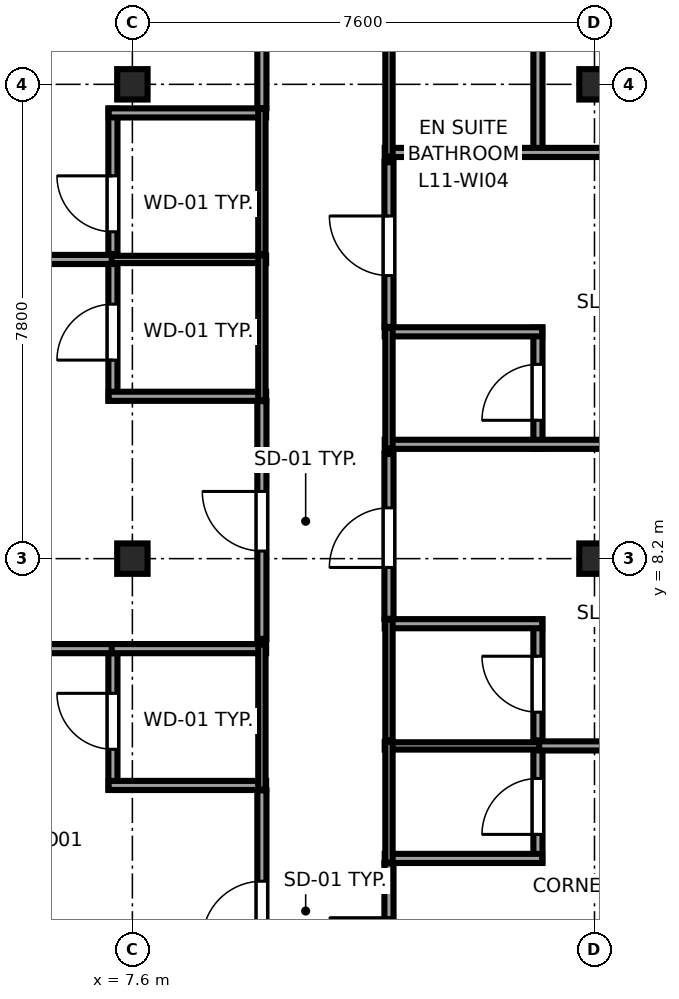
"""IFC4 building model, lengths in metres.
Left out: names, types, materials, properties, quantities, classifications, styles, units other than length and angle.
Written with IfcOpenShell. Run it as: python <this file> out.ifc"""

import sys

from ifc_helpers import new_model, si_unit, direction, frame, frame_2d, origin, origin_2d, place, context, subcontext, project, spatial, rectangle, i_section, extrude, source, transform, mapped, element, fill, save


model = new_model("IFC4")
c1 = context("Model", 3, precision=1e-05, world=origin(), true_north=direction((0.0, 1.0)))
c2 = subcontext(c1, "Body", "Model", "MODEL_VIEW")
j1 = project(units=[si_unit("LENGTHUNIT", "METRE"), si_unit("PLANEANGLEUNIT", "RADIAN")], contexts=[c1])
p1 = place(None, origin())
s1 = spatial("IfcSite", under=j1, at=p1, CompositionType="ELEMENT")
p2 = place(p1, origin())
s2 = spatial("IfcBuilding", under=s1, at=p2, CompositionType="ELEMENT")
p3 = place(p2, frame((0.0, 0.0, 49.75)))
s3 = spatial("IfcBuildingStorey", under=s2, at=p3, CompositionType="ELEMENT", Elevation=49.75)
m1 = source(origin(), c2, "Body", "SweptSolid", [
    extrude(i_section(OverallWidth=0.5, OverallDepth=0.5, WebThickness=0.028, FlangeThickness=0.045, at=origin_2d()), origin(), (0.0, 0.0, 1.0), 3.55),
])
for number, where, z_axis, x_axis in (
    (1, (7.6, 8.2, 0.0), (0.0, 0.0, 1.0), (1.0, 0.0, 0.0)),
    (2, (7.6, 16.0, 0.0), (0.0, 0.0, 1.0), (1.0, 0.0, 0.0)),
    (3, (15.2, 8.2, 0.0), (0.0, 0.0, 1.0), (1.0, 0.0, 0.0)),
    (4, (15.2, 16.0, 0.0), (0.0, 0.0, 1.0), (1.0, 0.0, 0.0)),
):
    element("IfcColumn", number, at=place(p3, frame(where, z_axis=z_axis, x_axis=x_axis)), inside=s3, PredefinedType="COLUMN", context=c2, shape_type="MappedRepresentation", body=[
        mapped(m1, transform((0.0, 0.0, 0.0), x_axis=(1.0, 0.0, 0.0), y_axis=(0.0, 1.0, 0.0), z_axis=(0.0, 0.0, 1.0), scale=1.0)),
    ])
p4 = place(p3, frame((7.28, 4.4, 0.0), z_axis=(0.0, 0.0, 1.0), x_axis=(0.0, 1.0, 0.0)))
e5 = element("IfcWall", 5, at=p4, inside=s3, PredefinedType="PARTITIONING", context=c2, shape_type="SweptSolid", body=[
    extrude(rectangle(XDim=2.39, YDim=0.15, at=frame_2d((1.195, 0.0))), origin(), (0.0, 0.0, 1.0), 3.37),
])
p5 = place(p4, frame((0.665, 0.0, 0.0)))
e6 = element("IfcOpeningElement", 6, at=p5, cuts=e5, PredefinedType="OPENING", context=c2, shape_type="SweptSolid", body=[
    extrude(rectangle(XDim=0.92, YDim=2.01, at=frame_2d((0.46, 1.005))), frame((0.0, 0.085, 0.0), z_axis=(0.0, -1.0, 0.0), x_axis=(1.0, 0.0, 0.0)), (0.0, 0.0, 1.0), 0.17),
])
for number, where, z_axis, x_axis in (
    (7, (7.21, 4.47, 0.0), (0.0, 0.0, 1.0), (1.0, 0.0, 0.0)),
    (8, (7.21, 6.72, 0.0), (0.0, 0.0, 1.0), (1.0, 0.0, 0.0)),
):
    element("IfcWall", number, at=place(p3, frame(where, z_axis=z_axis, x_axis=x_axis)), inside=s3, PredefinedType="PARTITIONING", context=c2, shape_type="SweptSolid", body=[
        extrude(rectangle(XDim=2.59, YDim=0.15, at=frame_2d((1.295, 0.0))), origin(), (0.0, 0.0, 1.0), 3.37),
    ])
p6 = place(p3, frame((9.73, 4.4, 0.0), z_axis=(0.0, 0.0, 1.0), x_axis=(0.0, 1.0, 0.0)))
e9 = element("IfcWall", 9, at=p6, inside=s3, PredefinedType="PLUMBINGWALL", context=c2, shape_type="SweptSolid", body=[
    extrude(rectangle(XDim=2.39, YDim=0.12, at=frame_2d((1.195, 0.0))), origin(), (0.0, 0.0, 1.0), 3.37),
])
p7 = place(p3, frame((7.28, 10.8, 0.0), z_axis=(0.0, 0.0, 1.0), x_axis=(0.0, 1.0, 0.0)))
e10 = element("IfcWall", 10, at=p7, inside=s3, PredefinedType="PARTITIONING", context=c2, shape_type="SweptSolid", body=[
    extrude(rectangle(XDim=2.39, YDim=0.15, at=frame_2d((1.195, 0.0))), origin(), (0.0, 0.0, 1.0), 3.37),
])
p8 = place(p7, frame((0.665, 0.0, 0.0)))
e11 = element("IfcOpeningElement", 11, at=p8, cuts=e10, PredefinedType="OPENING", context=c2, shape_type="SweptSolid", body=[
    extrude(rectangle(XDim=0.92, YDim=2.01, at=frame_2d((0.46, 1.005))), frame((0.0, 0.085, 0.0), z_axis=(0.0, -1.0, 0.0), x_axis=(1.0, 0.0, 0.0)), (0.0, 0.0, 1.0), 0.17),
])
p9 = place(p3, frame((7.21, 10.87, 0.0), z_axis=(0.0, 0.0, 1.0), x_axis=(1.0, 0.0, 0.0)))
e12 = element("IfcWall", 12, at=p9, inside=s3, PredefinedType="PARTITIONING", context=c2, shape_type="SweptSolid", body=[
    extrude(rectangle(XDim=2.59, YDim=0.15, at=frame_2d((1.295, 0.0))), origin(), (0.0, 0.0, 1.0), 3.37),
])
p10 = place(p3, frame((7.21, 13.12, 0.0), z_axis=(0.0, 0.0, 1.0), x_axis=(1.0, 0.0, 0.0)))
e13 = element("IfcWall", 13, at=p10, inside=s3, PredefinedType="PLUMBINGWALL", context=c2, shape_type="SweptSolid", body=[
    extrude(rectangle(XDim=2.59, YDim=0.12, at=frame_2d((1.295, 0.0))), origin(), (0.0, 0.0, 1.0), 3.37),
])
p11 = place(p3, frame((9.73, 10.8, 0.0), z_axis=(0.0, 0.0, 1.0), x_axis=(0.0, 1.0, 0.0)))
e14 = element("IfcWall", 14, at=p11, inside=s3, PredefinedType="PLUMBINGWALL", context=c2, shape_type="SweptSolid", body=[
    extrude(rectangle(XDim=2.39, YDim=0.12, at=frame_2d((1.195, 0.0))), origin(), (0.0, 0.0, 1.0), 3.37),
])
p12 = place(p3, frame((7.28, 13.21, 0.0), z_axis=(0.0, 0.0, 1.0), x_axis=(0.0, 1.0, 0.0)))
e15 = element("IfcWall", 15, at=p12, inside=s3, PredefinedType="PARTITIONING", context=c2, shape_type="SweptSolid", body=[
    extrude(rectangle(XDim=2.39, YDim=0.15, at=frame_2d((1.195, 0.0))), origin(), (0.0, 0.0, 1.0), 3.37),
])
p13 = place(p12, frame((0.365, 0.0, 0.0)))
e16 = element("IfcOpeningElement", 16, at=p13, cuts=e15, PredefinedType="OPENING", context=c2, shape_type="SweptSolid", body=[
    extrude(rectangle(XDim=0.92, YDim=2.01, at=frame_2d((0.46, 1.005))), frame((0.0, 0.085, 0.0), z_axis=(0.0, -1.0, 0.0), x_axis=(1.0, 0.0, 0.0)), (0.0, 0.0, 1.0), 0.17),
])
p14 = place(p3, frame((7.21, 15.53, 0.0), z_axis=(0.0, 0.0, 1.0), x_axis=(1.0, 0.0, 0.0)))
e17 = element("IfcWall", 17, at=p14, inside=s3, PredefinedType="PARTITIONING", context=c2, shape_type="SweptSolid", body=[
    extrude(rectangle(XDim=2.59, YDim=0.15, at=frame_2d((1.295, 0.0))), origin(), (0.0, 0.0, 1.0), 3.37),
])
p15 = place(p3, frame((9.73, 13.21, 0.0), z_axis=(0.0, 0.0, 1.0), x_axis=(0.0, 1.0, 0.0)))
e18 = element("IfcWall", 18, at=p15, inside=s3, PredefinedType="PLUMBINGWALL", context=c2, shape_type="SweptSolid", body=[
    extrude(rectangle(XDim=2.39, YDim=0.12, at=frame_2d((1.195, 0.0))), origin(), (0.0, 0.0, 1.0), 3.37),
])
p16 = place(p3, frame((14.27, 3.2, 0.0), z_axis=(0.0, 0.0, 1.0), x_axis=(0.0, 1.0, 0.0)))
e19 = element("IfcWall", 19, at=p16, inside=s3, PredefinedType="PARTITIONING", context=c2, shape_type="SweptSolid", body=[
    extrude(rectangle(XDim=1.99, YDim=0.15, at=frame_2d((0.995, 0.0))), origin(), (0.0, 0.0, 1.0), 3.37),
])
p17 = place(p16, frame((0.465, 0.0, 0.0)))
e20 = element("IfcOpeningElement", 20, at=p17, cuts=e19, PredefinedType="OPENING", context=c2, shape_type="SweptSolid", body=[
    extrude(rectangle(XDim=0.92, YDim=2.01, at=frame_2d((0.46, 1.005))), frame((0.0, 0.085, 0.0), z_axis=(0.0, -1.0, 0.0), x_axis=(1.0, 0.0, 0.0)), (0.0, 0.0, 1.0), 0.17),
])
p18 = place(p3, frame((11.75, 3.27, 0.0), z_axis=(0.0, 0.0, 1.0), x_axis=(1.0, 0.0, 0.0)))
e21 = element("IfcWall", 21, at=p18, inside=s3, PredefinedType="PARTITIONING", context=c2, shape_type="SweptSolid", body=[
    extrude(rectangle(XDim=2.59, YDim=0.15, at=frame_2d((1.295, 0.0))), origin(), (0.0, 0.0, 1.0), 3.37),
])
p19 = place(p3, frame((11.75, 5.12, 0.0), z_axis=(0.0, 0.0, 1.0), x_axis=(1.0, 0.0, 0.0)))
e22 = element("IfcWall", 22, at=p19, inside=s3, PredefinedType="PLUMBINGWALL", context=c2, shape_type="SweptSolid", body=[
    extrude(rectangle(XDim=2.59, YDim=0.12, at=frame_2d((1.295, 0.0))), origin(), (0.0, 0.0, 1.0), 3.37),
])
p20 = place(p3, frame((11.82, 3.2, 0.0), z_axis=(0.0, 0.0, 1.0), x_axis=(0.0, 1.0, 0.0)))
e23 = element("IfcWall", 23, at=p20, inside=s3, PredefinedType="PLUMBINGWALL", context=c2, shape_type="SweptSolid", body=[
    extrude(rectangle(XDim=1.99, YDim=0.12, at=frame_2d((0.995, 0.0))), origin(), (0.0, 0.0, 1.0), 3.37),
])
p21 = place(p3, frame((14.27, 5.21, 0.0), z_axis=(0.0, 0.0, 1.0), x_axis=(0.0, 1.0, 0.0)))
e24 = element("IfcWall", 24, at=p21, inside=s3, PredefinedType="PARTITIONING", context=c2, shape_type="SweptSolid", body=[
    extrude(rectangle(XDim=1.99, YDim=0.15, at=frame_2d((0.995, 0.0))), origin(), (0.0, 0.0, 1.0), 3.37),
])
p22 = place(p21, frame((0.465, 0.0, 0.0)))
e25 = element("IfcOpeningElement", 25, at=p22, cuts=e24, PredefinedType="OPENING", context=c2, shape_type="SweptSolid", body=[
    extrude(rectangle(XDim=0.92, YDim=2.01, at=frame_2d((0.46, 1.005))), frame((0.0, 0.085, 0.0), z_axis=(0.0, -1.0, 0.0), x_axis=(1.0, 0.0, 0.0)), (0.0, 0.0, 1.0), 0.17),
])
p23 = place(p3, frame((11.75, 7.13, 0.0), z_axis=(0.0, 0.0, 1.0), x_axis=(1.0, 0.0, 0.0)))
e26 = element("IfcWall", 26, at=p23, inside=s3, PredefinedType="PARTITIONING", context=c2, shape_type="SweptSolid", body=[
    extrude(rectangle(XDim=2.59, YDim=0.15, at=frame_2d((1.295, 0.0))), origin(), (0.0, 0.0, 1.0), 3.37),
])
p24 = place(p3, frame((11.82, 5.21, 0.0), z_axis=(0.0, 0.0, 1.0), x_axis=(0.0, 1.0, 0.0)))
e27 = element("IfcWall", 27, at=p24, inside=s3, PredefinedType="PLUMBINGWALL", context=c2, shape_type="SweptSolid", body=[
    extrude(rectangle(XDim=1.99, YDim=0.12, at=frame_2d((0.995, 0.0))), origin(), (0.0, 0.0, 1.0), 3.37),
])
p25 = place(p3, frame((14.27, 10.01, 0.0), z_axis=(0.0, 0.0, 1.0), x_axis=(0.0, 1.0, 0.0)))
e28 = element("IfcWall", 28, at=p25, inside=s3, PredefinedType="PARTITIONING", context=c2, shape_type="SweptSolid", body=[
    extrude(rectangle(XDim=1.99, YDim=0.15, at=frame_2d((0.995, 0.0))), origin(), (0.0, 0.0, 1.0), 3.37),
])
p26 = place(p25, frame((0.465, 0.0, 0.0)))
e29 = element("IfcOpeningElement", 29, at=p26, cuts=e28, PredefinedType="OPENING", context=c2, shape_type="SweptSolid", body=[
    extrude(rectangle(XDim=0.92, YDim=2.01, at=frame_2d((0.46, 1.005))), frame((0.0, 0.085, 0.0), z_axis=(0.0, -1.0, 0.0), x_axis=(1.0, 0.0, 0.0)), (0.0, 0.0, 1.0), 0.17),
])
p27 = place(p3, frame((11.75, 10.08, 0.0), z_axis=(0.0, 0.0, 1.0), x_axis=(1.0, 0.0, 0.0)))
e30 = element("IfcWall", 30, at=p27, inside=s3, PredefinedType="PARTITIONING", context=c2, shape_type="SweptSolid", body=[
    extrude(rectangle(XDim=10.6, YDim=0.15, at=frame_2d((5.3, 0.0))), origin(), (0.0, 0.0, 1.0), 3.37),
])
p28 = place(p3, frame((11.75, 11.93, 0.0), z_axis=(0.0, 0.0, 1.0), x_axis=(1.0, 0.0, 0.0)))
e31 = element("IfcWall", 31, at=p28, inside=s3, PredefinedType="PARTITIONING", context=c2, shape_type="SweptSolid", body=[
    extrude(rectangle(XDim=2.59, YDim=0.15, at=frame_2d((1.295, 0.0))), origin(), (0.0, 0.0, 1.0), 3.37),
])
p29 = place(p3, frame((11.82, 10.01, 0.0), z_axis=(0.0, 0.0, 1.0), x_axis=(0.0, 1.0, 0.0)))
e32 = element("IfcWall", 32, at=p29, inside=s3, PredefinedType="PLUMBINGWALL", context=c2, shape_type="SweptSolid", body=[
    extrude(rectangle(XDim=1.99, YDim=0.12, at=frame_2d((0.995, 0.0))), origin(), (0.0, 0.0, 1.0), 3.37),
])
p30 = place(p3, frame((14.27, 14.81, 0.0), z_axis=(0.0, 0.0, 1.0), x_axis=(0.0, 1.0, 0.0)))
e33 = element("IfcWall", 33, at=p30, inside=s3, PredefinedType="PARTITIONING", context=c2, shape_type="SweptSolid", body=[
    extrude(rectangle(XDim=1.99, YDim=0.15, at=frame_2d((0.995, 0.0))), origin(), (0.0, 0.0, 1.0), 3.37),
])
p31 = place(p3, frame((11.75, 14.88, 0.0), z_axis=(0.0, 0.0, 1.0), x_axis=(1.0, 0.0, 0.0)))
e34 = element("IfcWall", 34, at=p31, inside=s3, PredefinedType="PARTITIONING", context=c2, shape_type="SweptSolid", body=[
    extrude(rectangle(XDim=10.6, YDim=0.15, at=frame_2d((5.3, 0.0))), origin(), (0.0, 0.0, 1.0), 3.37),
])
p32 = place(p3, frame((11.82, 14.81, 0.0), z_axis=(0.0, 0.0, 1.0), x_axis=(0.0, 1.0, 0.0)))
e35 = element("IfcWall", 35, at=p32, inside=s3, PredefinedType="PLUMBINGWALL", context=c2, shape_type="SweptSolid", body=[
    extrude(rectangle(XDim=1.99, YDim=0.12, at=frame_2d((0.995, 0.0))), origin(), (0.0, 0.0, 1.0), 3.37),
])
p33 = place(p3, frame((9.73, 0.405, 0.0), z_axis=(0.0, 0.0, 1.0), x_axis=(0.0, 1.0, 0.0)))
e36 = element("IfcWall", 36, at=p33, inside=s3, PredefinedType="PARTITIONING", context=c2, shape_type="SweptSolid", body=[
    extrude(rectangle(XDim=3.985, YDim=0.15, at=frame_2d((1.992, 0.0))), origin(), (0.0, 0.0, 1.0), 3.37),
])
p34 = place(p33, frame((1.51, 0.0, 0.0)))
e37 = element("IfcOpeningElement", 37, at=p34, cuts=e36, PredefinedType="OPENING", context=c2, shape_type="SweptSolid", body=[
    extrude(rectangle(XDim=0.98, YDim=2.12, at=frame_2d((0.49, 1.06))), frame((0.0, 0.085, 0.0), z_axis=(0.0, -1.0, 0.0), x_axis=(1.0, 0.0, 0.0)), (0.0, 0.0, 1.0), 0.17),
])
p35 = place(p3, frame((0.405, 6.72, 0.0), z_axis=(0.0, 0.0, 1.0), x_axis=(1.0, 0.0, 0.0)))
e38 = element("IfcWall", 38, at=p35, inside=s3, PredefinedType="PARTITIONING", context=c2, shape_type="SweptSolid", body=[
    extrude(rectangle(XDim=6.855, YDim=0.15, at=frame_2d((3.427, 0.0))), origin(), (0.0, 0.0, 1.0), 3.37),
])
p36 = place(p3, frame((9.73, 6.88, 0.0), z_axis=(0.0, 0.0, 1.0), x_axis=(0.0, 1.0, 0.0)))
e39 = element("IfcWall", 39, at=p36, inside=s3, PredefinedType="PARTITIONING", context=c2, shape_type="SweptSolid", body=[
    extrude(rectangle(XDim=3.91, YDim=0.15, at=frame_2d((1.955, 0.0))), origin(), (0.0, 0.0, 1.0), 3.37),
])
p37 = place(p36, frame((1.445, 0.0, 0.0)))
e40 = element("IfcOpeningElement", 40, at=p37, cuts=e39, PredefinedType="OPENING", context=c2, shape_type="SweptSolid", body=[
    extrude(rectangle(XDim=0.98, YDim=2.12, at=frame_2d((0.49, 1.06))), frame((0.0, 0.085, 0.0), z_axis=(0.0, -1.0, 0.0), x_axis=(1.0, 0.0, 0.0)), (0.0, 0.0, 1.0), 0.17),
])
p38 = place(p3, frame((0.405, 13.12, 0.0), z_axis=(0.0, 0.0, 1.0), x_axis=(1.0, 0.0, 0.0)))
e41 = element("IfcWall", 41, at=p38, inside=s3, PredefinedType="PARTITIONING", context=c2, shape_type="SweptSolid", body=[
    extrude(rectangle(XDim=6.855, YDim=0.15, at=frame_2d((3.427, 0.0))), origin(), (0.0, 0.0, 1.0), 3.37),
])
p39 = place(p3, frame((9.73, 15.61, 0.0), z_axis=(0.0, 0.0, 1.0), x_axis=(0.0, 1.0, 0.0)))
e42 = element("IfcWall", 42, at=p39, inside=s3, PredefinedType="PARTITIONING", context=c2, shape_type="SweptSolid", body=[
    extrude(rectangle(XDim=3.81, YDim=0.15, at=frame_2d((1.905, 0.0))), origin(), (0.0, 0.0, 1.0), 3.37),
])
p40 = place(p39, frame((1.395, 0.0, 0.0)))
e43 = element("IfcOpeningElement", 43, at=p40, cuts=e42, PredefinedType="OPENING", context=c2, shape_type="SweptSolid", body=[
    extrude(rectangle(XDim=0.98, YDim=2.12, at=frame_2d((0.49, 1.06))), frame((0.0, 0.085, 0.0), z_axis=(0.0, -1.0, 0.0), x_axis=(1.0, 0.0, 0.0)), (0.0, 0.0, 1.0), 0.17),
])
p41 = place(p3, frame((11.82, 0.405, 0.0), z_axis=(0.0, 0.0, 1.0), x_axis=(0.0, 1.0, 0.0)))
e44 = element("IfcWall", 44, at=p41, inside=s3, PredefinedType="PARTITIONING", context=c2, shape_type="SweptSolid", body=[
    extrude(rectangle(XDim=2.785, YDim=0.15, at=frame_2d((1.393, 0.0))), origin(), (0.0, 0.0, 1.0), 3.37),
])
p42 = place(p41, frame((0.91, 0.0, 0.0)))
e45 = element("IfcOpeningElement", 45, at=p42, cuts=e44, PredefinedType="OPENING", context=c2, shape_type="SweptSolid", body=[
    extrude(rectangle(XDim=0.98, YDim=2.12, at=frame_2d((0.49, 1.06))), frame((0.0, 0.085, 0.0), z_axis=(0.0, -1.0, 0.0), x_axis=(1.0, 0.0, 0.0)), (0.0, 0.0, 1.0), 0.17),
])
p43 = place(p3, frame((14.29, 5.12, 0.0), z_axis=(0.0, 0.0, 1.0), x_axis=(1.0, 0.0, 0.0)))
e46 = element("IfcWall", 46, at=p43, inside=s3, PredefinedType="PARTITIONING", context=c2, shape_type="SweptSolid", body=[
    extrude(rectangle(XDim=8.06, YDim=0.15, at=frame_2d((4.03, 0.0))), origin(), (0.0, 0.0, 1.0), 3.37),
])
p44 = place(p3, frame((11.82, 7.21, 0.0), z_axis=(0.0, 0.0, 1.0), x_axis=(0.0, 1.0, 0.0)))
e47 = element("IfcWall", 47, at=p44, inside=s3, PredefinedType="PARTITIONING", context=c2, shape_type="SweptSolid", body=[
    extrude(rectangle(XDim=2.71, YDim=0.15, at=frame_2d((1.355, 0.0))), origin(), (0.0, 0.0, 1.0), 3.37),
])
p45 = place(p44, frame((0.845, 0.0, 0.0)))
e48 = element("IfcOpeningElement", 48, at=p45, cuts=e47, PredefinedType="OPENING", context=c2, shape_type="SweptSolid", body=[
    extrude(rectangle(XDim=0.98, YDim=2.12, at=frame_2d((0.49, 1.06))), frame((0.0, 0.085, 0.0), z_axis=(0.0, -1.0, 0.0), x_axis=(1.0, 0.0, 0.0)), (0.0, 0.0, 1.0), 0.17),
])
p46 = place(p3, frame((11.82, 12.01, 0.0), z_axis=(0.0, 0.0, 1.0), x_axis=(0.0, 1.0, 0.0)))
e49 = element("IfcWall", 49, at=p46, inside=s3, PredefinedType="PARTITIONING", context=c2, shape_type="SweptSolid", body=[
    extrude(rectangle(XDim=2.71, YDim=0.15, at=frame_2d((1.355, 0.0))), origin(), (0.0, 0.0, 1.0), 3.37),
])
p47 = place(p46, frame((0.845, 0.0, 0.0)))
e50 = element("IfcOpeningElement", 50, at=p47, cuts=e49, PredefinedType="OPENING", context=c2, shape_type="SweptSolid", body=[
    extrude(rectangle(XDim=0.98, YDim=2.12, at=frame_2d((0.49, 1.06))), frame((0.0, 0.085, 0.0), z_axis=(0.0, -1.0, 0.0), x_axis=(1.0, 0.0, 0.0)), (0.0, 0.0, 1.0), 0.17),
])
m2 = source(origin(), c2, "Body", "SweptSolid", [
    extrude(rectangle(XDim=0.92, YDim=2.01, at=frame_2d((0.46, 1.005))), frame((0.0, 0.025, 0.0), z_axis=(0.0, -1.0, 0.0), x_axis=(1.0, 0.0, 0.0)), (0.0, 0.0, 1.0), 0.05),
])
p48 = place(p5, origin())
e51 = element("IfcDoor", 51, at=p48, inside=s3, OperationType="SINGLE_SWING_RIGHT", PredefinedType="DOOR", context=c2, shape_type="MappedRepresentation", body=[
    mapped(m2, transform((0.0, 0.0, 0.0), x_axis=(1.0, 0.0, 0.0), y_axis=(0.0, 1.0, 0.0), z_axis=(0.0, 0.0, 1.0), scale=1.0)),
])
fill(e6, e51)
p49 = place(p8, origin())
e52 = element("IfcDoor", 52, at=p49, inside=s3, OperationType="SINGLE_SWING_LEFT", PredefinedType="DOOR", context=c2, shape_type="MappedRepresentation", body=[
    mapped(m2, transform((0.0, 0.0, 0.0), x_axis=(1.0, 0.0, 0.0), y_axis=(0.0, 1.0, 0.0), z_axis=(0.0, 0.0, 1.0), scale=1.0)),
])
fill(e11, e52)
p50 = place(p13, origin())
e53 = element("IfcDoor", 53, at=p50, inside=s3, OperationType="SINGLE_SWING_RIGHT", PredefinedType="DOOR", context=c2, shape_type="MappedRepresentation", body=[
    mapped(m2, transform((0.0, 0.0, 0.0), x_axis=(1.0, 0.0, 0.0), y_axis=(0.0, 1.0, 0.0), z_axis=(0.0, 0.0, 1.0), scale=1.0)),
])
fill(e16, e53)
p51 = place(p17, origin())
e54 = element("IfcDoor", 54, at=p51, inside=s3, OperationType="SINGLE_SWING_LEFT", PredefinedType="DOOR", context=c2, shape_type="MappedRepresentation", body=[
    mapped(m2, transform((0.0, 0.0, 0.0), x_axis=(1.0, 0.0, 0.0), y_axis=(0.0, 1.0, 0.0), z_axis=(0.0, 0.0, 1.0), scale=1.0)),
])
fill(e20, e54)
p52 = place(p22, origin())
e55 = element("IfcDoor", 55, at=p52, inside=s3, OperationType="SINGLE_SWING_RIGHT", PredefinedType="DOOR", context=c2, shape_type="MappedRepresentation", body=[
    mapped(m2, transform((0.0, 0.0, 0.0), x_axis=(1.0, 0.0, 0.0), y_axis=(0.0, 1.0, 0.0), z_axis=(0.0, 0.0, 1.0), scale=1.0)),
])
fill(e25, e55)
p53 = place(p26, origin())
e56 = element("IfcDoor", 56, at=p53, inside=s3, OperationType="SINGLE_SWING_LEFT", PredefinedType="DOOR", context=c2, shape_type="MappedRepresentation", body=[
    mapped(m2, transform((0.0, 0.0, 0.0), x_axis=(1.0, 0.0, 0.0), y_axis=(0.0, 1.0, 0.0), z_axis=(0.0, 0.0, 1.0), scale=1.0)),
])
fill(e29, e56)
m3 = source(origin(), c2, "Body", "SweptSolid", [
    extrude(rectangle(XDim=0.98, YDim=2.12, at=frame_2d((0.49, 1.06))), frame((0.0, 0.025, 0.0), z_axis=(0.0, -1.0, 0.0), x_axis=(1.0, 0.0, 0.0)), (0.0, 0.0, 1.0), 0.05),
])
p54 = place(p34, origin())
e57 = element("IfcDoor", 57, at=p54, inside=s3, OperationType="SINGLE_SWING_LEFT", PredefinedType="DOOR", context=c2, shape_type="MappedRepresentation", body=[
    mapped(m3, transform((0.0, 0.0, 0.0), x_axis=(1.0, 0.0, 0.0), y_axis=(0.0, 1.0, 0.0), z_axis=(0.0, 0.0, 1.0), scale=1.0)),
])
fill(e37, e57)
p55 = place(p37, origin())
e58 = element("IfcDoor", 58, at=p55, inside=s3, OperationType="SINGLE_SWING_RIGHT", PredefinedType="DOOR", context=c2, shape_type="MappedRepresentation", body=[
    mapped(m3, transform((0.0, 0.0, 0.0), x_axis=(1.0, 0.0, 0.0), y_axis=(0.0, 1.0, 0.0), z_axis=(0.0, 0.0, 1.0), scale=1.0)),
])
fill(e40, e58)
p56 = place(p42, origin())
e59 = element("IfcDoor", 59, at=p56, inside=s3, OperationType="SINGLE_SWING_RIGHT", PredefinedType="DOOR", context=c2, shape_type="MappedRepresentation", body=[
    mapped(m3, transform((0.0, 0.0, 0.0), x_axis=(1.0, 0.0, 0.0), y_axis=(0.0, 1.0, 0.0), z_axis=(0.0, 0.0, 1.0), scale=1.0)),
])
fill(e45, e59)
p57 = place(p45, origin())
e60 = element("IfcDoor", 60, at=p57, inside=s3, OperationType="SINGLE_SWING_LEFT", PredefinedType="DOOR", context=c2, shape_type="MappedRepresentation", body=[
    mapped(m3, transform((0.0, 0.0, 0.0), x_axis=(1.0, 0.0, 0.0), y_axis=(0.0, 1.0, 0.0), z_axis=(0.0, 0.0, 1.0), scale=1.0)),
])
fill(e48, e60)
p58 = place(p47, origin())
e61 = element("IfcDoor", 61, at=p58, inside=s3, OperationType="SINGLE_SWING_RIGHT", PredefinedType="DOOR", context=c2, shape_type="MappedRepresentation", body=[
    mapped(m3, transform((0.0, 0.0, 0.0), x_axis=(1.0, 0.0, 0.0), y_axis=(0.0, 1.0, 0.0), z_axis=(0.0, 0.0, 1.0), scale=1.0)),
])
fill(e50, e61)
save(model, sys.argv[1])
